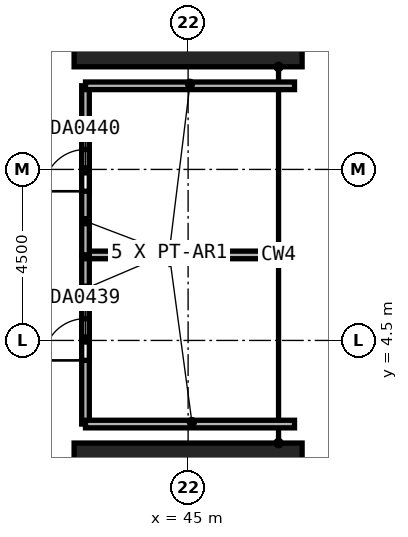
"""IFC4 building model, lengths in metres.
Left out: names, types, materials, properties, quantities, classifications, styles, units other than length and angle.
Written with IfcOpenShell. Run it as: python <this file> out.ifc"""

import sys

from ifc_helpers import new_model, si_unit, direction, frame, frame_2d, origin, origin_2d, place, context, subcontext, project, spatial, rectangle, extrude, element, fill, save


model = new_model("IFC4")
c1 = context("Model", 3, precision=1e-05, world=origin(), true_north=direction((0.0, 1.0)))
c2 = subcontext(c1, "Body", "Model", "MODEL_VIEW")
j1 = project(units=[si_unit("LENGTHUNIT", "METRE"), si_unit("PLANEANGLEUNIT", "RADIAN")], contexts=[c1])
p1 = place(None, origin())
s1 = spatial("IfcSite", under=j1, at=p1, CompositionType="ELEMENT")
p2 = place(p1, origin())
s2 = spatial("IfcBuilding", under=s1, at=p2, CompositionType="ELEMENT")
p3 = place(p2, frame((0.0, 0.0, 37.0)))
s3 = spatial("IfcBuildingStorey", under=s2, at=p3, CompositionType="ELEMENT", Elevation=37.0)
for number, where, z_axis, x_axis in (
    (1, (45.0, 0.0, 0.0), (0.0, 0.0, 1.0), (0.0, 1.0, 0.0)),
    (2, (45.0, 13.5, 0.0), (0.0, 0.0, 1.0), (0.0, 1.0, 0.0)),
):
    element("IfcColumn", number, at=place(p3, frame(where, z_axis=z_axis, x_axis=x_axis)), inside=s3, PredefinedType="COLUMN", context=c2, shape_type="SweptSolid", body=[
        extrude(rectangle(XDim=3.6, YDim=6.0, at=origin_2d()), origin(), (0.0, 0.0, 1.0), 5.8),
    ])
p4 = place(p3, frame((42.3, 2.3, 0.0), z_axis=(0.0, 0.0, 1.0), x_axis=(0.0, 1.0, 0.0)))
e3 = element("IfcWall", 3, at=p4, inside=s3, PredefinedType="PARTITIONING", context=c2, shape_type="SweptSolid", body=[
    extrude(rectangle(XDim=4.45, YDim=0.2, at=frame_2d((2.225, 0.0))), origin(), (0.0, 0.0, 1.0), 6.7),
])
p5 = place(p4, frame((1.675, 0.0, 0.0)))
e4 = element("IfcOpeningElement", 4, at=p5, cuts=e3, PredefinedType="OPENING", context=c2, shape_type="SweptSolid", body=[
    extrude(rectangle(XDim=1.1, YDim=2.4, at=frame_2d((0.55, 1.2))), frame((0.0, 0.1, 0.0), z_axis=(0.0, -1.0, 0.0), x_axis=(1.0, 0.0, 0.0)), (0.0, 0.0, 1.0), 0.2),
])
for number, where, z_axis, x_axis in (
    (5, (42.3, 2.3, 0.0), (0.0, 0.0, 1.0), (1.0, 0.0, 0.0)),
    (6, (42.3, 6.75, 0.0), (0.0, 0.0, 1.0), (1.0, 0.0, 0.0)),
):
    element("IfcWall", number, at=place(p3, frame(where, z_axis=z_axis, x_axis=x_axis)), inside=s3, PredefinedType="PARTITIONING", context=c2, shape_type="SweptSolid", body=[
        extrude(rectangle(XDim=5.5, YDim=0.2, at=frame_2d((2.75, 0.0))), origin(), (0.0, 0.0, 1.0), 6.7),
    ])
p6 = place(p3, frame((42.3, 6.75, 0.0), z_axis=(0.0, 0.0, 1.0), x_axis=(0.0, 1.0, 0.0)))
e7 = element("IfcWall", 7, at=p6, inside=s3, PredefinedType="PARTITIONING", context=c2, shape_type="SweptSolid", body=[
    extrude(rectangle(XDim=4.45, YDim=0.2, at=frame_2d((2.225, 0.0))), origin(), (0.0, 0.0, 1.0), 6.7),
])
p7 = place(p6, frame((1.675, 0.0, 0.0)))
e8 = element("IfcOpeningElement", 8, at=p7, cuts=e7, PredefinedType="OPENING", context=c2, shape_type="SweptSolid", body=[
    extrude(rectangle(XDim=1.1, YDim=2.4, at=frame_2d((0.55, 1.2))), frame((0.0, 0.1, 0.0), z_axis=(0.0, -1.0, 0.0), x_axis=(1.0, 0.0, 0.0)), (0.0, 0.0, 1.0), 0.2),
])
p8 = place(p3, frame((42.3, 11.2, 0.0), z_axis=(0.0, 0.0, 1.0), x_axis=(1.0, 0.0, 0.0)))
e9 = element("IfcWall", 9, at=p8, inside=s3, PredefinedType="PARTITIONING", context=c2, shape_type="SweptSolid", body=[
    extrude(rectangle(XDim=5.5, YDim=0.2, at=frame_2d((2.75, 0.0))), origin(), (0.0, 0.0, 1.0), 6.7),
])
p9 = place(p5, origin())
e10 = element("IfcDoor", 10, at=p9, inside=s3, OperationType="DOUBLE_DOOR_SINGLE_SWING", PredefinedType="DOOR", context=c2, shape_type="SweptSolid", body=[
    extrude(rectangle(XDim=1.1, YDim=2.4, at=frame_2d((0.55, 1.2))), frame((0.0, 0.025, 0.0), z_axis=(0.0, -1.0, 0.0), x_axis=(1.0, 0.0, 0.0)), (0.0, 0.0, 1.0), 0.05),
])
fill(e4, e10)
p10 = place(p7, origin())
e11 = element("IfcDoor", 11, at=p10, inside=s3, OperationType="DOUBLE_DOOR_SINGLE_SWING", PredefinedType="DOOR", context=c2, shape_type="SweptSolid", body=[
    extrude(rectangle(XDim=1.1, YDim=2.4, at=frame_2d((0.55, 1.2))), frame((0.0, 0.025, 0.0), z_axis=(0.0, -1.0, 0.0), x_axis=(1.0, 0.0, 0.0)), (0.0, 0.0, 1.0), 0.05),
])
fill(e8, e11)
save(model, sys.argv[1])
